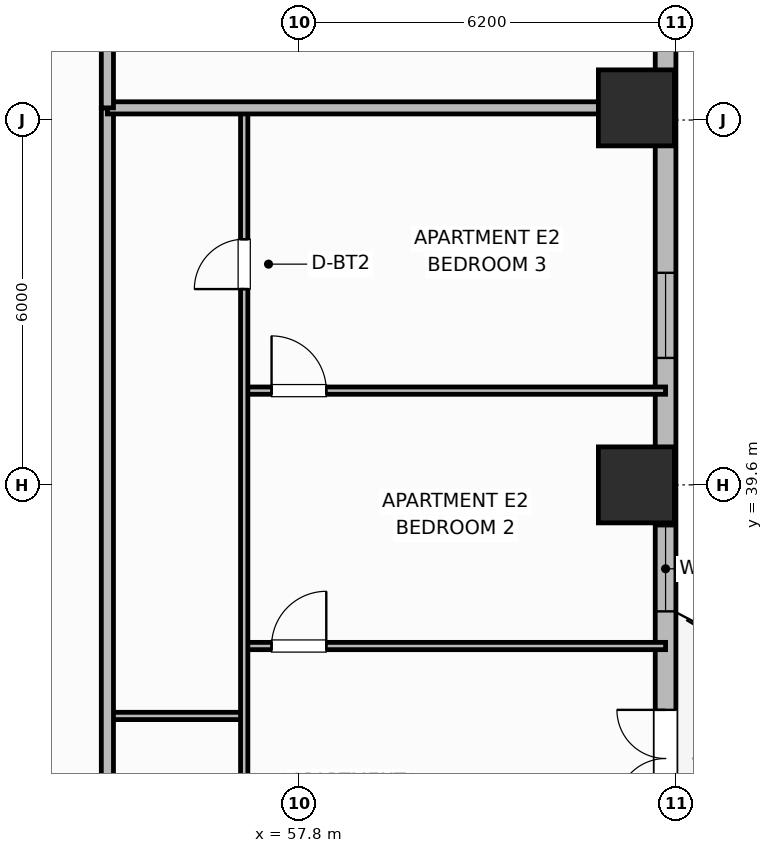
"""IFC4 building model, lengths in metres.
Left out: names, types, materials, properties, quantities, classifications, styles, units other than length and angle.
Written with IfcOpenShell. Run it as: python <this file> out.ifc"""

import sys

from ifc_helpers import new_model, si_unit, direction, frame, frame_2d, origin, origin_2d, place, context, subcontext, project, spatial, rectangle, extrude, element, fill, save


model = new_model("IFC4")
c1 = context("Model", 3, precision=1e-05, world=origin(), true_north=direction((0.0, 1.0)))
c2 = subcontext(c1, "Body", "Model", "MODEL_VIEW")
j1 = project(units=[si_unit("LENGTHUNIT", "METRE"), si_unit("PLANEANGLEUNIT", "RADIAN")], contexts=[c1])
p1 = place(None, origin())
s1 = spatial("IfcSite", under=j1, at=p1, CompositionType="ELEMENT")
p2 = place(p1, origin())
s2 = spatial("IfcBuilding", under=s1, at=p2, CompositionType="ELEMENT")
p3 = place(p2, frame((0.0, 0.0, 43.6)))
s3 = spatial("IfcBuildingStorey", under=s2, at=p3, CompositionType="ELEMENT", Elevation=43.6)
for number, where, z_axis, x_axis in (
    (1, (63.35, 39.6, 0.0), (0.0, 0.0, 1.0), (1.0, 0.0, 0.0)),
    (2, (63.35, 45.8, 0.0), (0.0, 0.0, 1.0), (1.0, 0.0, 0.0)),
):
    element("IfcColumn", number, at=place(p3, frame(where, z_axis=z_axis, x_axis=x_axis)), inside=s3, PredefinedType="COLUMN", context=c2, shape_type="SweptSolid", body=[
        extrude(rectangle(XDim=1.25, YDim=1.25, at=origin_2d()), origin(), (0.0, 0.0, 1.0), 3.7),
    ])
p4 = place(p3, frame((63.83, 32.6, 0.0), z_axis=(0.0, 0.0, 1.0), x_axis=(0.0, 1.0, 0.0)))
e3 = element("IfcWall", 3, at=p4, inside=s3, PredefinedType="SOLIDWALL", context=c2, shape_type="SweptSolid", body=[
    extrude(rectangle(XDim=14.8, YDim=0.34, at=frame_2d((7.4, 0.0))), origin(), (0.0, 0.0, 1.0), 2.7),
])
p5 = place(p4, frame((1.7, 0.0, 0.0)))
e4 = element("IfcOpeningElement", 4, at=p5, cuts=e3, PredefinedType="OPENING", context=c2, shape_type="SweptSolid", body=[
    extrude(rectangle(XDim=1.6, YDim=2.1, at=frame_2d((0.8, 1.05))), frame((0.0, 0.18, 0.0), z_axis=(0.0, -1.0, 0.0), x_axis=(1.0, 0.0, 0.0)), (0.0, 0.0, 1.0), 0.36),
])
p6 = place(p4, frame((4.92, 0.0, 0.69)))
e5 = element("IfcOpeningElement", 5, at=p6, cuts=e3, PredefinedType="OPENING", context=c2, shape_type="SweptSolid", body=[
    extrude(rectangle(XDim=1.4, YDim=1.85, at=frame_2d((0.7, 0.925))), frame((0.0, 0.18, 0.0), z_axis=(0.0, -1.0, 0.0), x_axis=(1.0, 0.0, 0.0)), (0.0, 0.0, 1.0), 0.36),
])
p7 = place(p4, frame((9.087, 0.0, 0.73)))
e6 = element("IfcOpeningElement", 6, at=p7, cuts=e3, PredefinedType="OPENING", context=c2, shape_type="SweptSolid", body=[
    extrude(rectangle(XDim=1.4, YDim=1.85, at=frame_2d((0.7, 0.925))), frame((0.0, 0.18, 0.0), z_axis=(0.0, -1.0, 0.0), x_axis=(1.0, 0.0, 0.0)), (0.0, 0.0, 1.0), 0.36),
])
p8 = place(p3, frame((54.65, 35.8, 0.0), z_axis=(0.0, 0.0, 1.0), x_axis=(1.0, 0.0, 0.0)))
e7 = element("IfcWall", 7, at=p8, inside=s3, PredefinedType="PARTITIONING", context=c2, shape_type="SweptSolid", body=[
    extrude(rectangle(XDim=2.25, YDim=0.12, at=frame_2d((1.125, 0.0))), origin(), (0.0, 0.0, 1.0), 2.53),
])
p9 = place(p3, frame((56.9, 36.95, 0.0), z_axis=(0.0, 0.0, 1.0), x_axis=(1.0, 0.0, 0.0)))
e8 = element("IfcWall", 8, at=p9, inside=s3, PredefinedType="PARTITIONING", context=c2, shape_type="SweptSolid", body=[
    extrude(rectangle(XDim=6.93, YDim=0.12, at=frame_2d((3.465, 0.0))), origin(), (0.0, 0.0, 1.0), 2.53),
])
p10 = place(p9, frame((0.45, 0.0, 0.0)))
e9 = element("IfcOpeningElement", 9, at=p10, cuts=e8, PredefinedType="OPENING", context=c2, shape_type="SweptSolid", body=[
    extrude(rectangle(XDim=0.9, YDim=2.1, at=frame_2d((0.45, 1.05))), frame((0.0, 0.07, 0.0), z_axis=(0.0, -1.0, 0.0), x_axis=(1.0, 0.0, 0.0)), (0.0, 0.0, 1.0), 0.14),
])
p11 = place(p3, frame((56.9, 41.15, 0.0), z_axis=(0.0, 0.0, 1.0), x_axis=(1.0, 0.0, 0.0)))
e10 = element("IfcWall", 10, at=p11, inside=s3, PredefinedType="PARTITIONING", context=c2, shape_type="SweptSolid", body=[
    extrude(rectangle(XDim=6.93, YDim=0.12, at=frame_2d((3.465, 0.0))), origin(), (0.0, 0.0, 1.0), 2.53),
])
p12 = place(p11, frame((0.45, 0.0, 0.0)))
e11 = element("IfcOpeningElement", 11, at=p12, cuts=e10, PredefinedType="OPENING", context=c2, shape_type="SweptSolid", body=[
    extrude(rectangle(XDim=0.9, YDim=2.1, at=frame_2d((0.45, 1.05))), frame((0.0, 0.07, 0.0), z_axis=(0.0, -1.0, 0.0), x_axis=(1.0, 0.0, 0.0)), (0.0, 0.0, 1.0), 0.14),
])
p13 = place(p3, frame((56.9, 26.64, 0.0), z_axis=(0.0, 0.0, 1.0), x_axis=(0.0, 1.0, 0.0)))
e12 = element("IfcWall", 12, at=p13, inside=s3, PredefinedType="PARTITIONING", context=c2, shape_type="SweptSolid", body=[
    extrude(rectangle(XDim=19.12, YDim=0.12, at=frame_2d((9.56, 0.0))), origin(), (0.0, 0.0, 1.0), 2.53),
])
p14 = place(p13, frame((2.81, 0.0, 0.0)))
e13 = element("IfcOpeningElement", 13, at=p14, cuts=e12, PredefinedType="OPENING", context=c2, shape_type="SweptSolid", body=[
    extrude(rectangle(XDim=0.9, YDim=2.1, at=frame_2d((0.45, 1.05))), frame((0.0, 0.07, 0.0), z_axis=(0.0, -1.0, 0.0), x_axis=(1.0, 0.0, 0.0)), (0.0, 0.0, 1.0), 0.14),
])
p15 = place(p13, frame((16.18, 0.0, 0.0)))
e14 = element("IfcOpeningElement", 14, at=p15, cuts=e12, PredefinedType="OPENING", context=c2, shape_type="SweptSolid", body=[
    extrude(rectangle(XDim=0.82, YDim=2.08, at=frame_2d((0.41, 1.04))), frame((0.0, 0.07, 0.0), z_axis=(0.0, -1.0, 0.0), x_axis=(1.0, 0.0, 0.0)), (0.0, 0.0, 1.0), 0.14),
])
p16 = place(p3, frame((54.65, 10.6, 0.0), z_axis=(0.0, 0.0, 1.0), x_axis=(0.0, 1.0, 0.0)))
e15 = element("IfcWall", 15, at=p16, inside=s3, PredefinedType="PARTITIONING", context=c2, shape_type="SweptSolid", body=[
    extrude(rectangle(XDim=35.2, YDim=0.2, at=frame_2d((17.6, 0.0))), origin(), (0.0, 0.0, 1.0), 2.53),
])
p17 = place(p16, frame((2.65, 0.0, 0.0)))
e16 = element("IfcOpeningElement", 16, at=p17, cuts=e15, PredefinedType="OPENING", context=c2, shape_type="SweptSolid", body=[
    extrude(rectangle(XDim=1.0, YDim=2.15, at=frame_2d((0.5, 1.075))), frame((0.0, 0.11, 0.0), z_axis=(0.0, -1.0, 0.0), x_axis=(1.0, 0.0, 0.0)), (0.0, 0.0, 1.0), 0.22),
])
p18 = place(p16, frame((19.95, 0.0, 0.0)))
e17 = element("IfcOpeningElement", 17, at=p18, cuts=e15, PredefinedType="OPENING", context=c2, shape_type="SweptSolid", body=[
    extrude(rectangle(XDim=1.0, YDim=2.15, at=frame_2d((0.5, 1.075))), frame((0.0, 0.11, 0.0), z_axis=(0.0, -1.0, 0.0), x_axis=(1.0, 0.0, 0.0)), (0.0, 0.0, 1.0), 0.22),
])
p19 = place(p3, frame((54.65, 45.8, 0.0), z_axis=(0.0, 0.0, 1.0), x_axis=(1.0, 0.0, 0.0)))
e18 = element("IfcWall", 18, at=p19, inside=s3, PredefinedType="PARTITIONING", context=c2, shape_type="SweptSolid", body=[
    extrude(rectangle(XDim=8.76, YDim=0.2, at=frame_2d((4.38, 0.0))), origin(), (0.0, 0.0, 1.0), 2.53),
])
p20 = place(p3, frame((54.65, 45.8, 0.0), z_axis=(0.0, 0.0, 1.0), x_axis=(0.0, 1.0, 0.0)))
e19 = element("IfcWall", 19, at=p20, inside=s3, PredefinedType="PARTITIONING", context=c2, shape_type="SweptSolid", body=[
    extrude(rectangle(XDim=5.63, YDim=0.2, at=frame_2d((2.815, 0.0))), origin(), (0.0, 0.0, 1.0), 2.53),
])
p21 = place(p5, origin())
e20 = element("IfcDoor", 20, at=p21, inside=s3, OperationType="DOUBLE_DOOR_SINGLE_SWING", PredefinedType="DOOR", context=c2, shape_type="SweptSolid", body=[
    extrude(rectangle(XDim=1.6, YDim=2.1, at=frame_2d((0.8, 1.05))), frame((0.0, 0.025, 0.0), z_axis=(0.0, -1.0, 0.0), x_axis=(1.0, 0.0, 0.0)), (0.0, 0.0, 1.0), 0.05),
])
fill(e4, e20)
p22 = place(p6, origin())
e21 = element("IfcWindow", 21, at=p22, inside=s3, PartitioningType="SINGLE_PANEL", PredefinedType="WINDOW", context=c2, shape_type="SweptSolid", body=[
    extrude(rectangle(XDim=1.4, YDim=1.85, at=frame_2d((0.7, 0.925))), frame((0.0, 0.03, 0.0), z_axis=(0.0, -1.0, 0.0), x_axis=(1.0, 0.0, 0.0)), (0.0, 0.0, 1.0), 0.06),
])
fill(e5, e21)
p23 = place(p7, origin())
e22 = element("IfcWindow", 22, at=p23, inside=s3, PartitioningType="SINGLE_PANEL", PredefinedType="WINDOW", context=c2, shape_type="SweptSolid", body=[
    extrude(rectangle(XDim=1.4, YDim=1.85, at=frame_2d((0.7, 0.925))), frame((0.0, 0.03, 0.0), z_axis=(0.0, -1.0, 0.0), x_axis=(1.0, 0.0, 0.0)), (0.0, 0.0, 1.0), 0.06),
])
fill(e6, e22)
p24 = place(p10, origin())
e23 = element("IfcDoor", 23, at=p24, inside=s3, OperationType="SINGLE_SWING_RIGHT", PredefinedType="DOOR", context=c2, shape_type="SweptSolid", body=[
    extrude(rectangle(XDim=0.9, YDim=2.1, at=frame_2d((0.45, 1.05))), frame((0.0, 0.025, 0.0), z_axis=(0.0, -1.0, 0.0), x_axis=(1.0, 0.0, 0.0)), (0.0, 0.0, 1.0), 0.05),
])
fill(e9, e23)
p25 = place(p12, origin())
e24 = element("IfcDoor", 24, at=p25, inside=s3, OperationType="SINGLE_SWING_LEFT", PredefinedType="DOOR", context=c2, shape_type="SweptSolid", body=[
    extrude(rectangle(XDim=0.9, YDim=2.1, at=frame_2d((0.45, 1.05))), frame((0.0, 0.025, 0.0), z_axis=(0.0, -1.0, 0.0), x_axis=(1.0, 0.0, 0.0)), (0.0, 0.0, 1.0), 0.05),
])
fill(e11, e24)
p26 = place(p15, origin())
e25 = element("IfcDoor", 25, at=p26, inside=s3, OperationType="SINGLE_SWING_LEFT", PredefinedType="DOOR", context=c2, shape_type="SweptSolid", body=[
    extrude(rectangle(XDim=0.82, YDim=2.08, at=frame_2d((0.41, 1.04))), frame((0.0, 0.025, 0.0), z_axis=(0.0, -1.0, 0.0), x_axis=(1.0, 0.0, 0.0)), (0.0, 0.0, 1.0), 0.05),
])
fill(e14, e25)
save(model, sys.argv[1])
